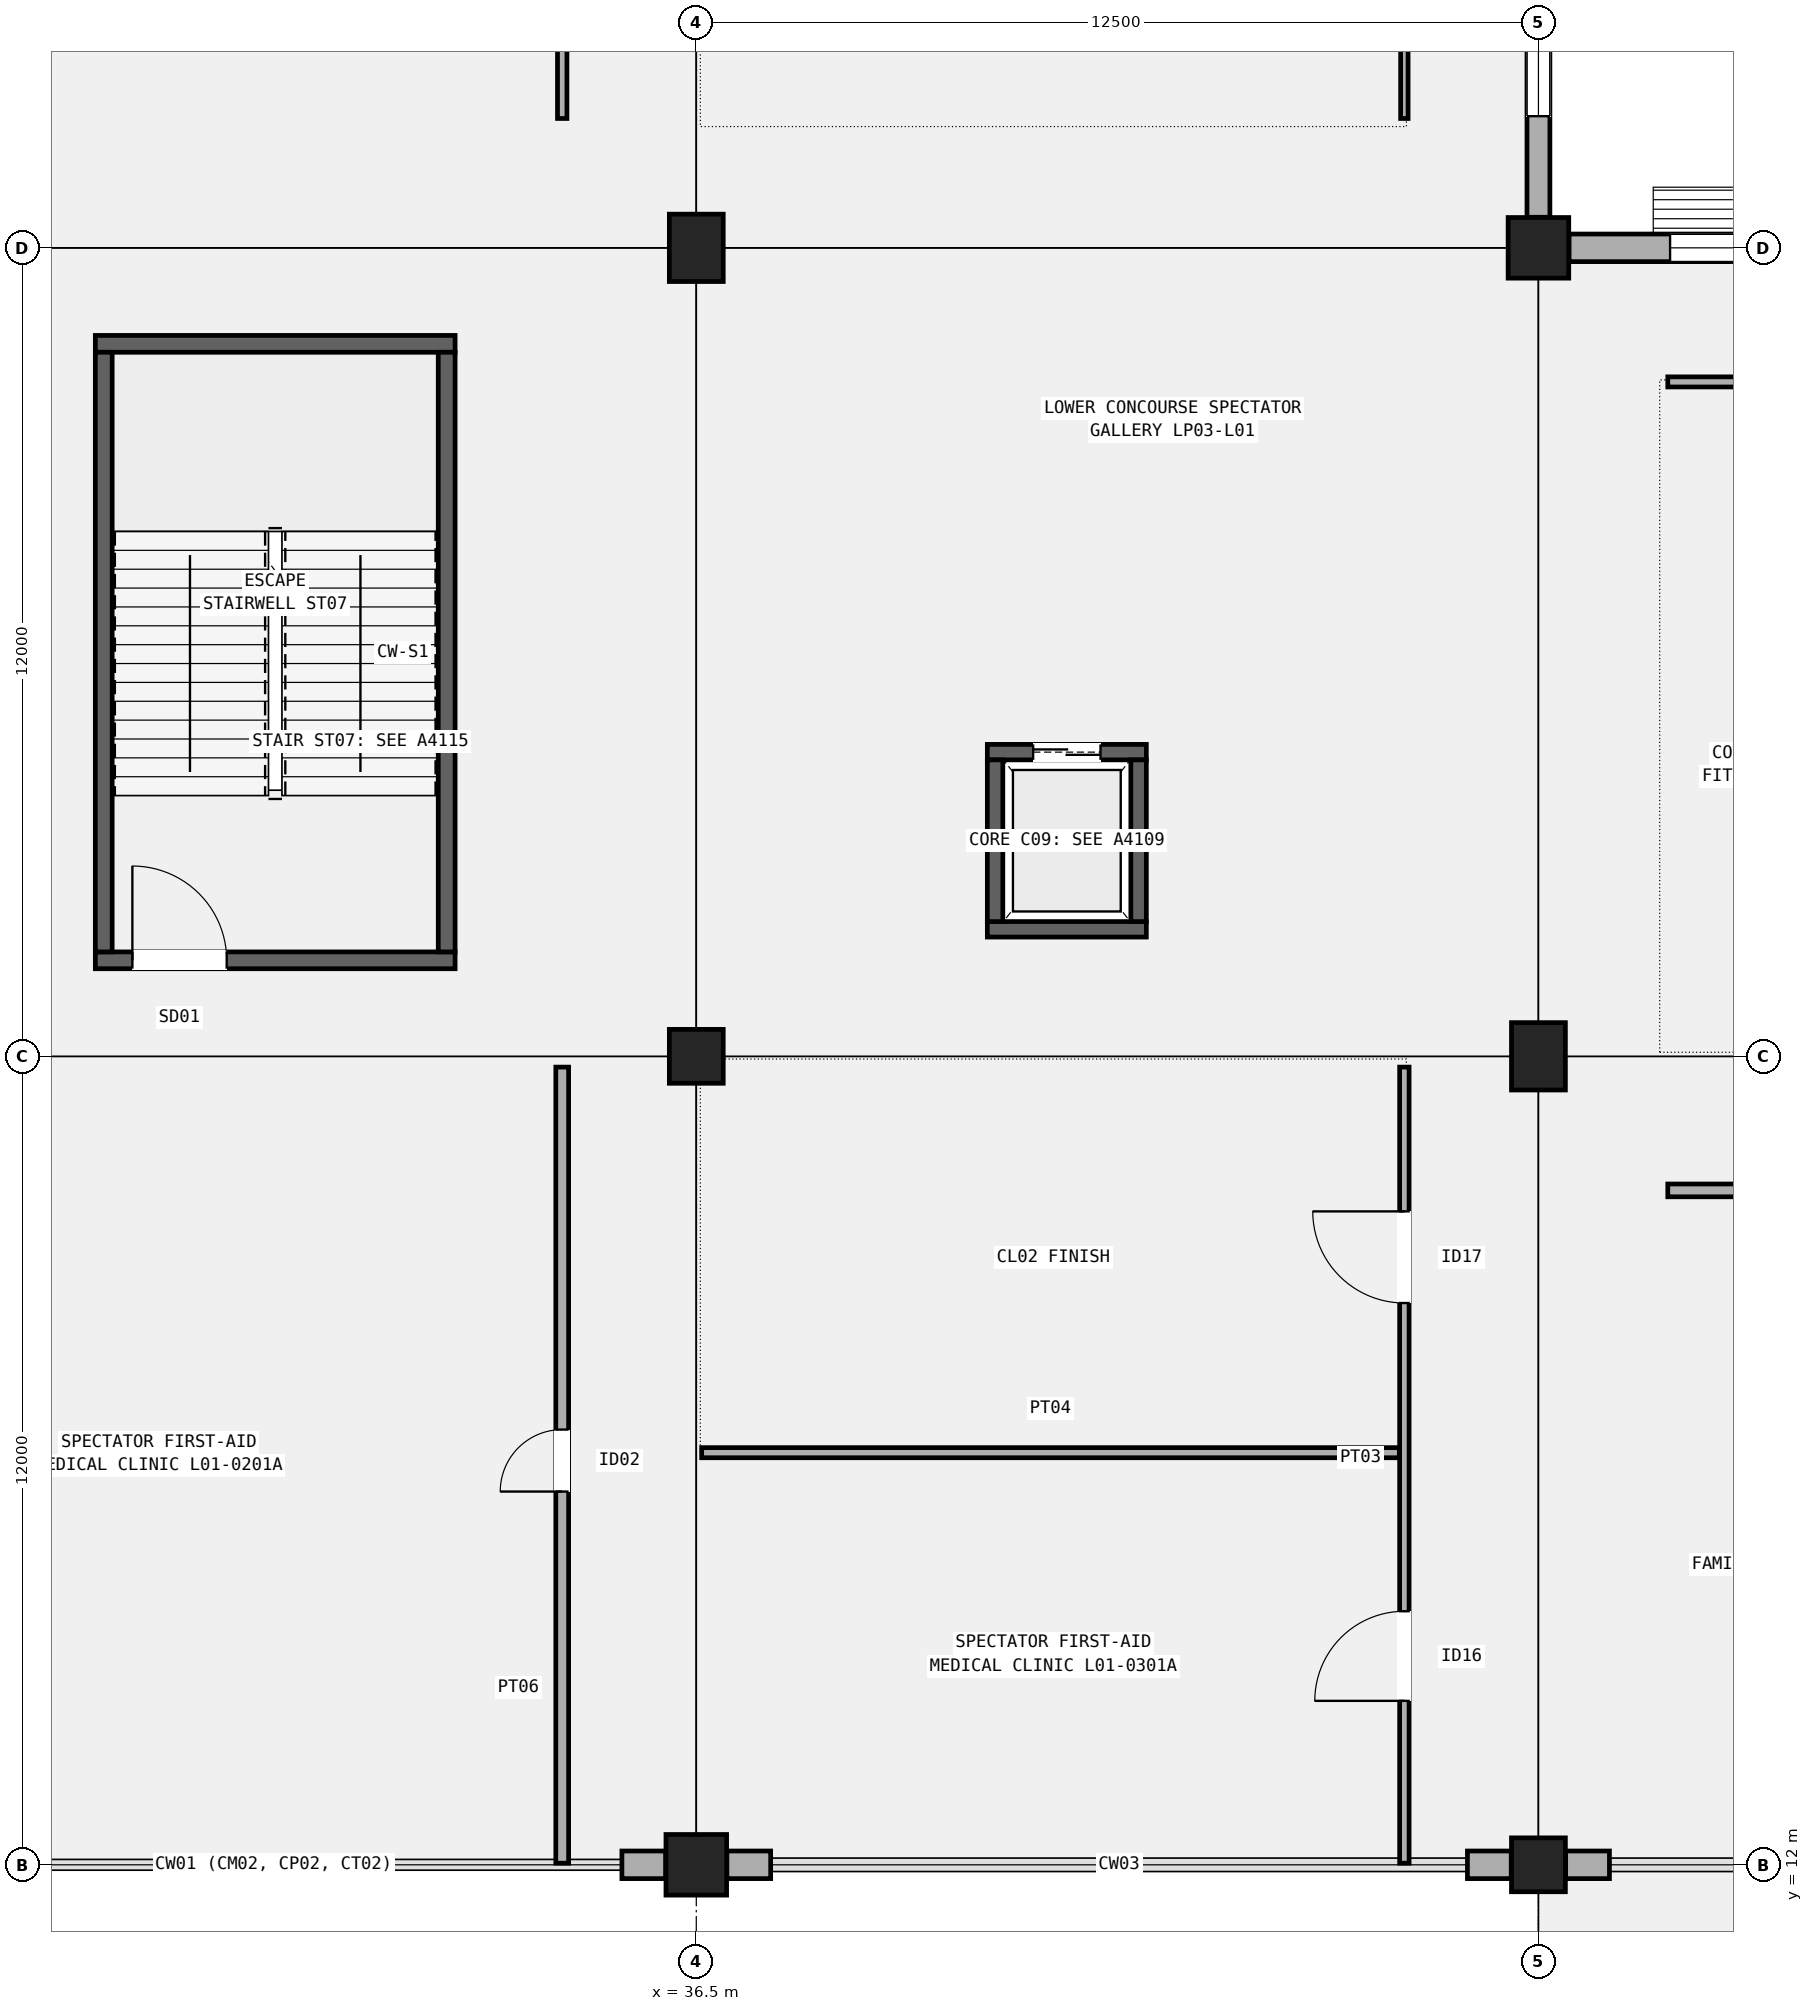
"""IFC4 building model, lengths in metres.
Left out: names, types, materials, properties, quantities, classifications, styles, units other than length and angle.
Written with IfcOpenShell. Run it as: python <this file> out.ifc"""

import sys

from ifc_helpers import new_model, si_unit, direction, frame, frame_2d, origin, origin_2d, place, context, subcontext, project, spatial, rectangle, extrude, element, fill, save


model = new_model("IFC4")
c1 = context("Model", 3, precision=1e-05, world=origin(), true_north=direction((0.0, 1.0)))
c2 = subcontext(c1, "Body", "Model", "MODEL_VIEW")
j1 = project(units=[si_unit("LENGTHUNIT", "METRE"), si_unit("PLANEANGLEUNIT", "RADIAN")], contexts=[c1])
p1 = place(None, origin())
s1 = spatial("IfcSite", under=j1, at=p1, CompositionType="ELEMENT")
p2 = place(p1, origin())
s2 = spatial("IfcBuilding", under=s1, at=p2, CompositionType="ELEMENT")
p3 = place(p2, frame((0.0, 0.0, 5.4)))
s3 = spatial("IfcBuildingStorey", under=s2, at=p3, CompositionType="ELEMENT", Elevation=5.4)
p4 = place(p3, frame((36.5, 12.0, 0.0), z_axis=(0.0, 0.0, 1.0), x_axis=(1.0, 0.0, 0.0)))
e1 = element("IfcColumn", 1, at=p4, inside=s3, PredefinedType="COLUMN", context=c2, shape_type="SweptSolid", body=[
    extrude(rectangle(XDim=0.9, YDim=0.9, at=origin_2d()), origin(), (0.0, 0.0, 1.0), 4.8),
])
p5 = place(p3, frame((36.5, 24.0, 0.0), z_axis=(0.0, 0.0, 1.0), x_axis=(1.0, 0.0, 0.0)))
e2 = element("IfcColumn", 2, at=p5, inside=s3, PredefinedType="COLUMN", context=c2, shape_type="SweptSolid", body=[
    extrude(rectangle(XDim=0.8, YDim=0.8, at=origin_2d()), origin(), (0.0, 0.0, 1.0), 4.8),
])
p6 = place(p3, frame((36.5, 36.0, 0.0), z_axis=(0.0, 0.0, 1.0), x_axis=(1.0, 0.0, 0.0)))
e3 = element("IfcColumn", 3, at=p6, inside=s3, PredefinedType="COLUMN", context=c2, shape_type="SweptSolid", body=[
    extrude(rectangle(XDim=0.8, YDim=1.0, at=origin_2d()), origin(), (0.0, 0.0, 1.0), 4.8),
])
p7 = place(p3, frame((49.0, 12.0, 0.0), z_axis=(0.0, 0.0, 1.0), x_axis=(1.0, 0.0, 0.0)))
e4 = element("IfcColumn", 4, at=p7, inside=s3, PredefinedType="COLUMN", context=c2, shape_type="SweptSolid", body=[
    extrude(rectangle(XDim=0.8, YDim=0.8, at=origin_2d()), origin(), (0.0, 0.0, 1.0), 4.8),
])
p8 = place(p3, frame((49.0, 24.0, 0.0), z_axis=(0.0, 0.0, 1.0), x_axis=(1.0, 0.0, 0.0)))
e5 = element("IfcColumn", 5, at=p8, inside=s3, PredefinedType="COLUMN", context=c2, shape_type="SweptSolid", body=[
    extrude(rectangle(XDim=0.8, YDim=1.0, at=origin_2d()), origin(), (0.0, 0.0, 1.0), 4.8),
])
p9 = place(p3, frame((49.0, 36.0, 0.0), z_axis=(0.0, 0.0, 1.0), x_axis=(1.0, 0.0, 0.0)))
e6 = element("IfcColumn", 6, at=p9, inside=s3, PredefinedType="COLUMN", context=c2, shape_type="SweptSolid", body=[
    extrude(rectangle(XDim=0.9, YDim=0.9, at=origin_2d()), origin(), (0.0, 0.0, 1.0), 4.8),
])
p10 = place(p3, frame((35.396, 12.0, 0.0), z_axis=(0.0, 0.0, 1.0), x_axis=(1.0, 0.0, 0.0)))
e7 = element("IfcWall", 7, at=p10, inside=s3, PredefinedType="SOLIDWALL", context=c2, shape_type="SweptSolid", body=[
    extrude(rectangle(XDim=0.65, YDim=0.41, at=frame_2d((0.325, 0.0))), origin(), (0.0, 0.0, 1.0), 4.2),
])
for number, where, z_axis, x_axis in (
    (8, (36.954, 12.0, 0.0), (0.0, 0.0, 1.0), (1.0, 0.0, 0.0)),
    (9, (47.946, 12.0, 0.0), (0.0, 0.0, 1.0), (1.0, 0.0, 0.0)),
):
    element("IfcWall", number, at=place(p3, frame(where, z_axis=z_axis, x_axis=x_axis)), inside=s3, PredefinedType="SOLIDWALL", context=c2, shape_type="SweptSolid", body=[
        extrude(rectangle(XDim=0.65, YDim=0.41, at=frame_2d((0.325, 0.0))), origin(), (0.0, 0.0, 1.0), 4.15),
    ])
p11 = place(p3, frame((49.0, 36.454, 0.0), z_axis=(0.0, 0.0, 1.0), x_axis=(0.0, 1.0, 0.0)))
e10 = element("IfcWall", 10, at=p11, inside=s3, PredefinedType="SOLIDWALL", context=c2, shape_type="SweptSolid", body=[
    extrude(rectangle(XDim=11.142, YDim=0.34, at=frame_2d((5.571, 0.0))), origin(), (0.0, 0.0, 1.0), 4.2),
])
p12 = place(p11, frame((1.5, 0.0, 0.95)))
e11 = element("IfcOpeningElement", 11, at=p12, cuts=e10, PredefinedType="OPENING", context=c2, shape_type="SweptSolid", body=[
    extrude(rectangle(XDim=3.0, YDim=1.7, at=frame_2d((1.5, 0.85))), frame((0.0, 0.18, 0.0), z_axis=(0.0, -1.0, 0.0), x_axis=(1.0, 0.0, 0.0)), (0.0, 0.0, 1.0), 0.36),
])
p13 = place(p3, frame((49.404, 12.0, 0.0), z_axis=(0.0, 0.0, 1.0), x_axis=(1.0, 0.0, 0.0)))
e12 = element("IfcWall", 12, at=p13, inside=s3, PredefinedType="SOLIDWALL", context=c2, shape_type="SweptSolid", body=[
    extrude(rectangle(XDim=0.65, YDim=0.41, at=frame_2d((0.325, 0.0))), origin(), (0.0, 0.0, 1.0), 4.2),
])
p14 = place(p3, frame((49.454, 36.0, 0.0), z_axis=(0.0, 0.0, 1.0), x_axis=(1.0, 0.0, 0.0)))
e13 = element("IfcWall", 13, at=p14, inside=s3, PredefinedType="SOLIDWALL", context=c2, shape_type="SweptSolid", body=[
    extrude(rectangle(XDim=11.642, YDim=0.41, at=frame_2d((5.821, 0.0))), origin(), (0.0, 0.0, 1.0), 4.2),
])
p15 = place(p14, frame((1.5, 0.0, 0.95)))
e14 = element("IfcOpeningElement", 14, at=p15, cuts=e13, PredefinedType="OPENING", context=c2, shape_type="SweptSolid", body=[
    extrude(rectangle(XDim=3.6, YDim=1.75, at=frame_2d((1.8, 0.875))), frame((0.0, 0.215, 0.0), z_axis=(0.0, -1.0, 0.0), x_axis=(1.0, 0.0, 0.0)), (0.0, 0.0, 1.0), 0.43),
])
p16 = place(p3, frame((27.58, 25.425, 0.0), z_axis=(0.0, 0.0, 1.0), x_axis=(1.0, 0.0, 0.0)))
e15 = element("IfcWall", 15, at=p16, inside=s3, PredefinedType="SHEAR", context=c2, shape_type="SweptSolid", body=[
    extrude(rectangle(XDim=5.34, YDim=0.25, at=frame_2d((2.67, 0.0))), origin(), (0.0, 0.0, 1.0), 4.55),
])
p17 = place(p16, frame((0.55, 0.0, 0.0)))
e16 = element("IfcOpeningElement", 16, at=p17, cuts=e15, PredefinedType="OPENING", context=c2, shape_type="SweptSolid", body=[
    extrude(rectangle(XDim=1.4, YDim=2.15, at=frame_2d((0.7, 1.075))), frame((0.0, 0.135, 0.0), z_axis=(0.0, -1.0, 0.0), x_axis=(1.0, 0.0, 0.0)), (0.0, 0.0, 1.0), 0.27),
])
p18 = place(p3, frame((27.58, 34.575, 0.0), z_axis=(0.0, 0.0, 1.0), x_axis=(1.0, 0.0, 0.0)))
e17 = element("IfcWall", 17, at=p18, inside=s3, PredefinedType="SHEAR", context=c2, shape_type="SweptSolid", body=[
    extrude(rectangle(XDim=5.34, YDim=0.25, at=frame_2d((2.67, 0.0))), origin(), (0.0, 0.0, 1.0), 4.55),
])
for number, where, z_axis, x_axis in (
    (18, (27.705, 25.55, 0.0), (0.0, 0.0, 1.0), (0.0, 1.0, 0.0)),
    (19, (32.795, 25.55, 0.0), (0.0, 0.0, 1.0), (0.0, 1.0, 0.0)),
):
    element("IfcWall", number, at=place(p3, frame(where, z_axis=z_axis, x_axis=x_axis)), inside=s3, PredefinedType="SHEAR", context=c2, shape_type="SweptSolid", body=[
        extrude(rectangle(XDim=8.9, YDim=0.25, at=frame_2d((4.45, 0.0))), origin(), (0.0, 0.0, 1.0), 4.55),
    ])
p19 = place(p3, frame((40.82, 25.885, 0.0), z_axis=(0.0, 0.0, 1.0), x_axis=(1.0, 0.0, 0.0)))
e20 = element("IfcWall", 20, at=p19, inside=s3, PredefinedType="SHEAR", context=c2, shape_type="SweptSolid", body=[
    extrude(rectangle(XDim=2.36, YDim=0.23, at=frame_2d((1.18, 0.0))), origin(), (0.0, 0.0, 1.0), 4.55),
])
p20 = place(p3, frame((40.82, 28.515, 0.0), z_axis=(0.0, 0.0, 1.0), x_axis=(1.0, 0.0, 0.0)))
e21 = element("IfcWall", 21, at=p20, inside=s3, PredefinedType="SHEAR", context=c2, shape_type="SweptSolid", body=[
    extrude(rectangle(XDim=2.36, YDim=0.23, at=frame_2d((1.18, 0.0))), origin(), (0.0, 0.0, 1.0), 4.55),
])
p21 = place(p20, frame((0.68, 0.0, 0.0)))
e22 = element("IfcOpeningElement", 22, at=p21, cuts=e21, PredefinedType="OPENING", context=c2, shape_type="SweptSolid", body=[
    extrude(rectangle(XDim=1.0, YDim=2.15, at=frame_2d((0.5, 1.075))), frame((0.0, 0.125, 0.0), z_axis=(0.0, -1.0, 0.0), x_axis=(1.0, 0.0, 0.0)), (0.0, 0.0, 1.0), 0.25),
])
for number, where, z_axis, x_axis in (
    (23, (40.935, 26.0, 0.0), (0.0, 0.0, 1.0), (0.0, 1.0, 0.0)),
    (24, (43.065, 26.0, 0.0), (0.0, 0.0, 1.0), (0.0, 1.0, 0.0)),
):
    element("IfcWall", number, at=place(p3, frame(where, z_axis=z_axis, x_axis=x_axis)), inside=s3, PredefinedType="SHEAR", context=c2, shape_type="SweptSolid", body=[
        extrude(rectangle(XDim=2.4, YDim=0.23, at=frame_2d((1.2, 0.0))), origin(), (0.0, 0.0, 1.0), 4.55),
    ])
p22 = place(p3, frame((34.51, 12.024, 0.0), z_axis=(0.0, 0.0, 1.0), x_axis=(0.0, 1.0, 0.0)))
e25 = element("IfcWall", 25, at=p22, inside=s3, PredefinedType="PARTITIONING", context=c2, shape_type="SweptSolid", body=[
    extrude(rectangle(XDim=11.816, YDim=0.19, at=frame_2d((5.908, 0.0))), origin(), (0.0, 0.0, 1.0), 3.92),
])
p23 = place(p22, frame((5.516, 0.0, 0.0)))
e26 = element("IfcOpeningElement", 26, at=p23, cuts=e25, PredefinedType="OPENING", context=c2, shape_type="SweptSolid", body=[
    extrude(rectangle(XDim=0.92, YDim=2.1, at=frame_2d((0.46, 1.05))), frame((0.0, 0.105, 0.0), z_axis=(0.0, -1.0, 0.0), x_axis=(1.0, 0.0, 0.0)), (0.0, 0.0, 1.0), 0.21),
])
p24 = place(p3, frame((34.51, 37.92, 0.0), z_axis=(0.0, 0.0, 1.0), x_axis=(0.0, 1.0, 0.0)))
e27 = element("IfcWall", 27, at=p24, inside=s3, PredefinedType="PARTITIONING", context=c2, shape_type="SweptSolid", body=[
    extrude(rectangle(XDim=9.92, YDim=0.14, at=frame_2d((4.96, 0.0))), origin(), (0.0, 0.0, 1.0), 3.92),
])
p25 = place(p24, frame((4.485, 0.0, 0.0)))
e28 = element("IfcOpeningElement", 28, at=p25, cuts=e27, PredefinedType="OPENING", context=c2, shape_type="SweptSolid", body=[
    extrude(rectangle(XDim=0.95, YDim=2.12, at=frame_2d((0.475, 1.06))), frame((0.0, 0.08, 0.0), z_axis=(0.0, -1.0, 0.0), x_axis=(1.0, 0.0, 0.0)), (0.0, 0.0, 1.0), 0.16),
])
p26 = place(p3, frame((47.01, 12.024, 0.0), z_axis=(0.0, 0.0, 1.0), x_axis=(0.0, 1.0, 0.0)))
e29 = element("IfcWall", 29, at=p26, inside=s3, PredefinedType="PARTITIONING", context=c2, shape_type="SweptSolid", body=[
    extrude(rectangle(XDim=11.816, YDim=0.14, at=frame_2d((5.908, 0.0))), origin(), (0.0, 0.0, 1.0), 3.92),
])
p27 = place(p26, frame((2.409, 0.0, 0.0)))
e30 = element("IfcOpeningElement", 30, at=p27, cuts=e29, PredefinedType="OPENING", context=c2, shape_type="SweptSolid", body=[
    extrude(rectangle(XDim=1.33, YDim=2.22, at=frame_2d((0.665, 1.11))), frame((0.0, 0.08, 0.0), z_axis=(0.0, -1.0, 0.0), x_axis=(1.0, 0.0, 0.0)), (0.0, 0.0, 1.0), 0.16),
])
p28 = place(p26, frame((8.314, 0.0, 0.0)))
e31 = element("IfcOpeningElement", 31, at=p28, cuts=e29, PredefinedType="OPENING", context=c2, shape_type="SweptSolid", body=[
    extrude(rectangle(XDim=1.36, YDim=2.25, at=frame_2d((0.68, 1.125))), frame((0.0, 0.08, 0.0), z_axis=(0.0, -1.0, 0.0), x_axis=(1.0, 0.0, 0.0)), (0.0, 0.0, 1.0), 0.16),
])
p29 = place(p3, frame((36.58, 18.117, 0.0), z_axis=(0.0, 0.0, 1.0), x_axis=(1.0, 0.0, 0.0)))
e32 = element("IfcWall", 32, at=p29, inside=s3, PredefinedType="PARTITIONING", context=c2, shape_type="SweptSolid", body=[
    extrude(rectangle(XDim=10.355, YDim=0.15, at=frame_2d((5.177, 0.0))), origin(), (0.0, 0.0, 1.0), 3.92),
])
p30 = place(p3, frame((47.01, 37.92, 0.0), z_axis=(0.0, 0.0, 1.0), x_axis=(0.0, 1.0, 0.0)))
e33 = element("IfcWall", 33, at=p30, inside=s3, PredefinedType="PARTITIONING", context=c2, shape_type="SweptSolid", body=[
    extrude(rectangle(XDim=9.92, YDim=0.11, at=frame_2d((4.96, 0.0))), origin(), (0.0, 0.0, 1.0), 3.92),
])
p31 = place(p30, frame((4.26, 0.0, 0.0)))
e34 = element("IfcOpeningElement", 34, at=p31, cuts=e33, PredefinedType="OPENING", context=c2, shape_type="SweptSolid", body=[
    extrude(rectangle(XDim=1.4, YDim=2.24, at=frame_2d((0.7, 1.12))), frame((0.0, 0.065, 0.0), z_axis=(0.0, -1.0, 0.0), x_axis=(1.0, 0.0, 0.0)), (0.0, 0.0, 1.0), 0.13),
])
p32 = place(p3, frame((50.92, 22.01, 0.0), z_axis=(0.0, 0.0, 1.0), x_axis=(1.0, 0.0, 0.0)))
e35 = element("IfcWall", 35, at=p32, inside=s3, PredefinedType="PARTITIONING", context=c2, shape_type="SweptSolid", body=[
    extrude(rectangle(XDim=10.42, YDim=0.19, at=frame_2d((5.21, 0.0))), origin(), (0.0, 0.0, 1.0), 3.92),
])
p33 = place(p32, frame((3.147, 0.0, 0.0), z_axis=(0.0, 0.0, 1.0), x_axis=(-1.0, 0.0, 0.0)))
e36 = element("IfcOpeningElement", 36, at=p33, cuts=e35, PredefinedType="OPENING", context=c2, shape_type="SweptSolid", body=[
    extrude(rectangle(XDim=1.06, YDim=2.15, at=frame_2d((0.53, 1.075))), frame((0.0, 0.105, 0.0), z_axis=(0.0, -1.0, 0.0), x_axis=(1.0, 0.0, 0.0)), (0.0, 0.0, 1.0), 0.21),
])
p34 = place(p32, frame((8.452, 0.0, 0.0), z_axis=(0.0, 0.0, 1.0), x_axis=(-1.0, 0.0, 0.0)))
e37 = element("IfcOpeningElement", 37, at=p34, cuts=e35, PredefinedType="OPENING", context=c2, shape_type="SweptSolid", body=[
    extrude(rectangle(XDim=1.09, YDim=2.16, at=frame_2d((0.545, 1.08))), frame((0.0, 0.105, 0.0), z_axis=(0.0, -1.0, 0.0), x_axis=(1.0, 0.0, 0.0)), (0.0, 0.0, 1.0), 0.21),
])
p35 = place(p3, frame((50.92, 34.01, 0.0), z_axis=(0.0, 0.0, 1.0), x_axis=(1.0, 0.0, 0.0)))
e38 = element("IfcWall", 38, at=p35, inside=s3, PredefinedType="PARTITIONING", context=c2, shape_type="SweptSolid", body=[
    extrude(rectangle(XDim=10.42, YDim=0.15, at=frame_2d((5.21, 0.0))), origin(), (0.0, 0.0, 1.0), 3.92),
])
p36 = place(p35, frame((5.77, 0.0, 0.0), z_axis=(0.0, 0.0, 1.0), x_axis=(-1.0, 0.0, 0.0)))
e39 = element("IfcOpeningElement", 39, at=p36, cuts=e38, PredefinedType="OPENING", context=c2, shape_type="SweptSolid", body=[
    extrude(rectangle(XDim=1.12, YDim=2.18, at=frame_2d((0.56, 1.09))), frame((0.0, 0.085, 0.0), z_axis=(0.0, -1.0, 0.0), x_axis=(1.0, 0.0, 0.0)), (0.0, 0.0, 1.0), 0.17),
])
p37 = place(p12, origin())
e40 = element("IfcWindow", 40, at=p37, inside=s3, PartitioningType="SINGLE_PANEL", PredefinedType="WINDOW", context=c2, shape_type="SweptSolid", body=[
    extrude(rectangle(XDim=3.0, YDim=1.7, at=frame_2d((1.5, 0.85))), frame((0.0, 0.03, 0.0), z_axis=(0.0, -1.0, 0.0), x_axis=(1.0, 0.0, 0.0)), (0.0, 0.0, 1.0), 0.06),
])
fill(e11, e40)
p38 = place(p15, origin())
e41 = element("IfcWindow", 41, at=p38, inside=s3, PartitioningType="SINGLE_PANEL", PredefinedType="WINDOW", context=c2, shape_type="SweptSolid", body=[
    extrude(rectangle(XDim=3.6, YDim=1.75, at=frame_2d((1.8, 0.875))), frame((0.0, 0.03, 0.0), z_axis=(0.0, -1.0, 0.0), x_axis=(1.0, 0.0, 0.0)), (0.0, 0.0, 1.0), 0.06),
])
fill(e14, e41)
p39 = place(p17, origin())
e42 = element("IfcDoor", 42, at=p39, inside=s3, OperationType="SINGLE_SWING_LEFT", PredefinedType="DOOR", context=c2, shape_type="SweptSolid", body=[
    extrude(rectangle(XDim=1.4, YDim=2.15, at=frame_2d((0.7, 1.075))), frame((0.0, 0.025, 0.0), z_axis=(0.0, -1.0, 0.0), x_axis=(1.0, 0.0, 0.0)), (0.0, 0.0, 1.0), 0.05),
])
fill(e16, e42)
p40 = place(p21, origin())
e43 = element("IfcDoor", 43, at=p40, inside=s3, OperationType="DOUBLE_DOOR_SLIDING", PredefinedType="DOOR", context=c2, shape_type="SweptSolid", body=[
    extrude(rectangle(XDim=1.0, YDim=2.15, at=frame_2d((0.5, 1.075))), frame((0.0, 0.025, 0.0), z_axis=(0.0, -1.0, 0.0), x_axis=(1.0, 0.0, 0.0)), (0.0, 0.0, 1.0), 0.05),
])
fill(e22, e43)
p41 = place(p23, origin())
e44 = element("IfcDoor", 44, at=p41, inside=s3, OperationType="SINGLE_SWING_LEFT", PredefinedType="DOOR", context=c2, shape_type="SweptSolid", body=[
    extrude(rectangle(XDim=0.92, YDim=2.1, at=frame_2d((0.46, 1.05))), frame((0.0, 0.025, 0.0), z_axis=(0.0, -1.0, 0.0), x_axis=(1.0, 0.0, 0.0)), (0.0, 0.0, 1.0), 0.05),
])
fill(e26, e44)
p42 = place(p27, origin())
e45 = element("IfcDoor", 45, at=p42, inside=s3, OperationType="SINGLE_SWING_LEFT", PredefinedType="DOOR", context=c2, shape_type="SweptSolid", body=[
    extrude(rectangle(XDim=1.33, YDim=2.22, at=frame_2d((0.665, 1.11))), frame((0.0, 0.025, 0.0), z_axis=(0.0, -1.0, 0.0), x_axis=(1.0, 0.0, 0.0)), (0.0, 0.0, 1.0), 0.05),
])
fill(e30, e45)
p43 = place(p28, origin())
e46 = element("IfcDoor", 46, at=p43, inside=s3, OperationType="SINGLE_SWING_RIGHT", PredefinedType="DOOR", context=c2, shape_type="SweptSolid", body=[
    extrude(rectangle(XDim=1.36, YDim=2.25, at=frame_2d((0.68, 1.125))), frame((0.0, 0.025, 0.0), z_axis=(0.0, -1.0, 0.0), x_axis=(1.0, 0.0, 0.0)), (0.0, 0.0, 1.0), 0.05),
])
fill(e31, e46)
save(model, sys.argv[1])
